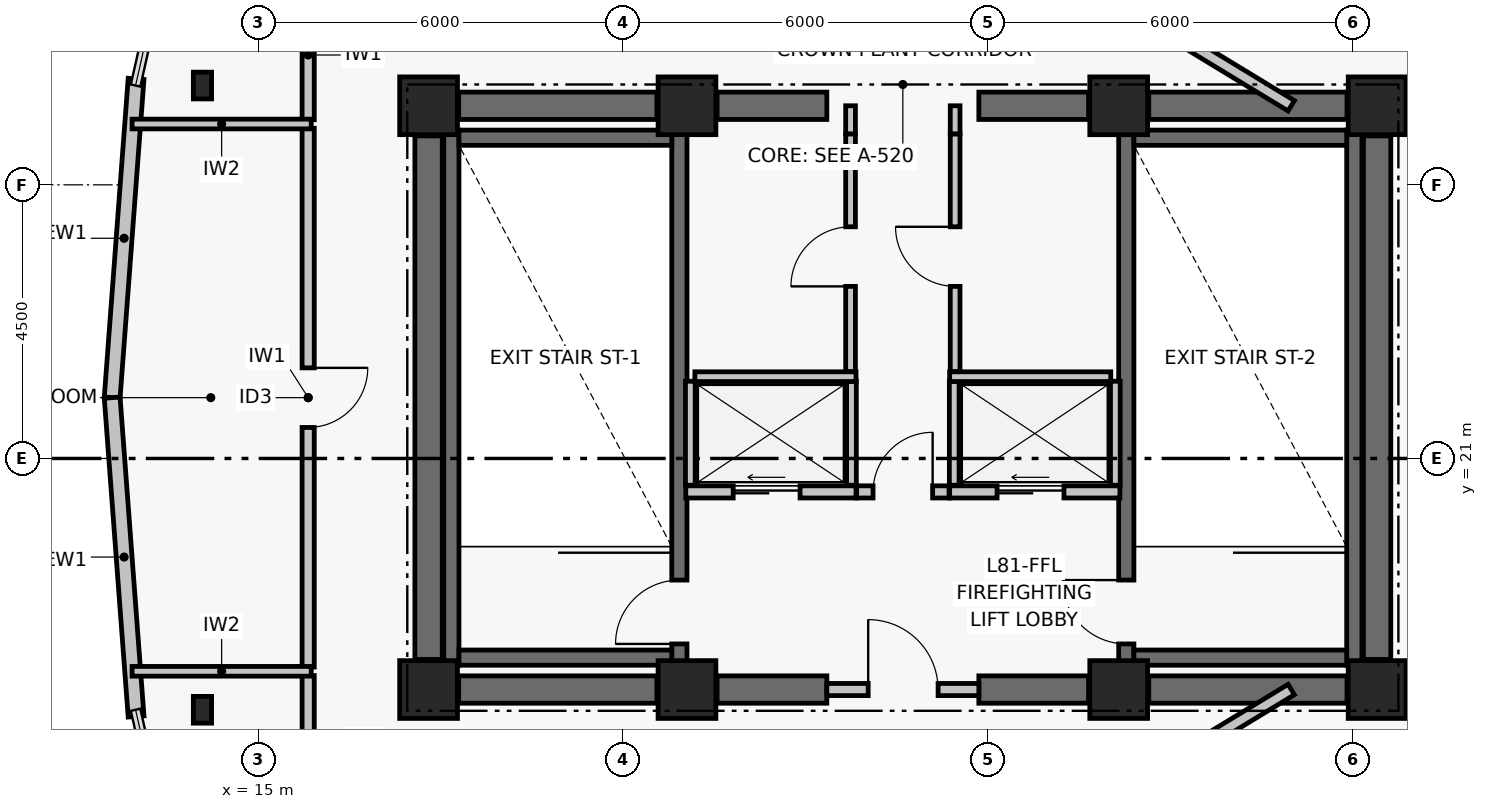
"""IFC4 building model, lengths in metres.
Left out: names, types, materials, properties, quantities, classifications, styles, units other than length and angle.
Written with IfcOpenShell. Run it as: python <this file> out.ifc"""

import sys

from ifc_helpers import new_model, si_unit, direction, frame, frame_2d, origin, origin_2d, place, context, subcontext, project, spatial, rectangle, i_section, extrude, element, fill, save


model = new_model("IFC4")
c1 = context("Model", 3, precision=1e-05, world=origin(), true_north=direction((0.0, 1.0)))
c2 = subcontext(c1, "Body", "Model", "MODEL_VIEW")
j1 = project(units=[si_unit("LENGTHUNIT", "METRE"), si_unit("PLANEANGLEUNIT", "RADIAN")], contexts=[c1])
p1 = place(None, origin())
s1 = spatial("IfcSite", under=j1, at=p1, CompositionType="ELEMENT")
p2 = place(p1, origin())
s2 = spatial("IfcBuilding", under=s1, at=p2, CompositionType="ELEMENT")
p3 = place(p2, frame((0.0, 0.0, 315.22)))
s3 = spatial("IfcBuildingStorey", under=s2, at=p3, CompositionType="ELEMENT", Elevation=315.22)
for number, where, z_axis, x_axis in (
    (1, (17.8, 17.2, 0.0), (0.0, 0.0, 1.0), (1.0, 0.0, 0.0)),
    (2, (22.05, 17.2, 0.0), (0.0, 0.0, 1.0), (1.0, 0.0, 0.0)),
    (3, (29.15, 17.2, 0.0), (0.0, 0.0, 1.0), (1.0, 0.0, 0.0)),
    (4, (33.4, 17.2, 0.0), (0.0, 0.0, 1.0), (1.0, 0.0, 0.0)),
    (5, (17.8, 26.8, 0.0), (0.0, 0.0, 1.0), (1.0, 0.0, 0.0)),
    (6, (22.05, 26.8, 0.0), (0.0, 0.0, 1.0), (1.0, 0.0, 0.0)),
    (7, (29.15, 26.8, 0.0), (0.0, 0.0, 1.0), (1.0, 0.0, 0.0)),
    (8, (33.4, 26.8, 0.0), (0.0, 0.0, 1.0), (1.0, 0.0, 0.0)),
):
    element("IfcColumn", number, at=place(p3, frame(where, z_axis=z_axis, x_axis=x_axis)), inside=s3, PredefinedType="COLUMN", context=c2, shape_type="SweptSolid", body=[
        extrude(rectangle(XDim=0.95, YDim=0.95, at=origin_2d()), origin(), (0.0, 0.0, 1.0), 3.2),
    ])
p4 = place(p3, frame((18.295, 17.2, 0.0), z_axis=(0.0, 0.0, 1.0), x_axis=(1.0, 0.0, 0.0)))
e9 = element("IfcWall", 9, at=p4, inside=s3, PredefinedType="SHEAR", context=c2, shape_type="SweptSolid", body=[
    extrude(rectangle(XDim=3.26, YDim=0.45, at=frame_2d((1.63, 0.0))), origin(), (0.0, 0.0, 1.0), 2.96),
])
p5 = place(p3, frame((22.545, 17.2, 0.0), z_axis=(0.0, 0.0, 1.0), x_axis=(1.0, 0.0, 0.0)))
e10 = element("IfcWall", 10, at=p5, inside=s3, PredefinedType="SHEAR", context=c2, shape_type="SweptSolid", body=[
    extrude(rectangle(XDim=1.805, YDim=0.45, at=frame_2d((0.903, 0.0))), origin(), (0.0, 0.0, 1.0), 2.96),
])
p6 = place(p3, frame((26.85, 17.2, 0.0), z_axis=(0.0, 0.0, 1.0), x_axis=(1.0, 0.0, 0.0)))
e11 = element("IfcWall", 11, at=p6, inside=s3, PredefinedType="SHEAR", context=c2, shape_type="SweptSolid", body=[
    extrude(rectangle(XDim=1.805, YDim=0.45, at=frame_2d((0.902, 0.0))), origin(), (0.0, 0.0, 1.0), 2.96),
])
for number, where, z_axis, x_axis in (
    (12, (29.645, 17.2, 0.0), (0.0, 0.0, 1.0), (1.0, 0.0, 0.0)),
    (13, (18.295, 26.8, 0.0), (0.0, 0.0, 1.0), (1.0, 0.0, 0.0)),
):
    element("IfcWall", number, at=place(p3, frame(where, z_axis=z_axis, x_axis=x_axis)), inside=s3, PredefinedType="SHEAR", context=c2, shape_type="SweptSolid", body=[
        extrude(rectangle(XDim=3.26, YDim=0.45, at=frame_2d((1.63, 0.0))), origin(), (0.0, 0.0, 1.0), 2.96),
    ])
p7 = place(p3, frame((22.545, 26.8, 0.0), z_axis=(0.0, 0.0, 1.0), x_axis=(1.0, 0.0, 0.0)))
e14 = element("IfcWall", 14, at=p7, inside=s3, PredefinedType="SHEAR", context=c2, shape_type="SweptSolid", body=[
    extrude(rectangle(XDim=1.805, YDim=0.45, at=frame_2d((0.903, 0.0))), origin(), (0.0, 0.0, 1.0), 2.96),
])
p8 = place(p3, frame((26.85, 26.8, 0.0), z_axis=(0.0, 0.0, 1.0), x_axis=(1.0, 0.0, 0.0)))
e15 = element("IfcWall", 15, at=p8, inside=s3, PredefinedType="SHEAR", context=c2, shape_type="SweptSolid", body=[
    extrude(rectangle(XDim=1.805, YDim=0.45, at=frame_2d((0.902, 0.0))), origin(), (0.0, 0.0, 1.0), 2.96),
])
p9 = place(p3, frame((29.645, 26.8, 0.0), z_axis=(0.0, 0.0, 1.0), x_axis=(1.0, 0.0, 0.0)))
e16 = element("IfcWall", 16, at=p9, inside=s3, PredefinedType="SHEAR", context=c2, shape_type="SweptSolid", body=[
    extrude(rectangle(XDim=3.26, YDim=0.45, at=frame_2d((1.63, 0.0))), origin(), (0.0, 0.0, 1.0), 2.96),
])
for number, where, z_axis, x_axis in (
    (17, (17.8, 17.695, 0.0), (0.0, 0.0, 1.0), (0.0, 1.0, 0.0)),
    (18, (33.4, 17.695, 0.0), (0.0, 0.0, 1.0), (0.0, 1.0, 0.0)),
):
    element("IfcWall", number, at=place(p3, frame(where, z_axis=z_axis, x_axis=x_axis)), inside=s3, PredefinedType="SHEAR", context=c2, shape_type="SweptSolid", body=[
        extrude(rectangle(XDim=8.61, YDim=0.45, at=frame_2d((4.305, 0.0))), origin(), (0.0, 0.0, 1.0), 2.96),
    ])
p10 = place(p3, frame((18.175, 17.6, 0.0), z_axis=(0.0, 0.0, 1.0), x_axis=(0.0, 1.0, 0.0)))
e19 = element("IfcWall", 19, at=p10, inside=s3, PredefinedType="SHEAR", context=c2, shape_type="SweptSolid", body=[
    extrude(rectangle(XDim=8.8, YDim=0.25, at=frame_2d((4.4, 0.0))), origin(), (0.0, 0.0, 1.0), 2.96),
])
p11 = place(p3, frame((21.925, 17.6, 0.0), z_axis=(0.0, 0.0, 1.0), x_axis=(0.0, 1.0, 0.0)))
e20 = element("IfcWall", 20, at=p11, inside=s3, PredefinedType="SHEAR", context=c2, shape_type="SweptSolid", body=[
    extrude(rectangle(XDim=8.8, YDim=0.25, at=frame_2d((4.4, 0.0))), origin(), (0.0, 0.0, 1.0), 2.96),
])
p12 = place(p11, frame((0.35, 0.0, 0.0)))
e21 = element("IfcOpeningElement", 21, at=p12, cuts=e20, PredefinedType="OPENING", context=c2, shape_type="SweptSolid", body=[
    extrude(rectangle(XDim=1.05, YDim=2.08, at=frame_2d((0.525, 1.04))), frame((0.0, 0.135, 0.0), z_axis=(0.0, -1.0, 0.0), x_axis=(1.0, 0.0, 0.0)), (0.0, 0.0, 1.0), 0.27),
])
for number, where, z_axis, x_axis in (
    (22, (18.3, 17.725, 0.0), (0.0, 0.0, 1.0), (1.0, 0.0, 0.0)),
    (23, (18.3, 26.275, 0.0), (0.0, 0.0, 1.0), (1.0, 0.0, 0.0)),
):
    element("IfcWall", number, at=place(p3, frame(where, z_axis=z_axis, x_axis=x_axis)), inside=s3, PredefinedType="SHEAR", context=c2, shape_type="SweptSolid", body=[
        extrude(rectangle(XDim=3.5, YDim=0.25, at=frame_2d((1.75, 0.0))), origin(), (0.0, 0.0, 1.0), 2.96),
    ])
p13 = place(p3, frame((29.275, 17.6, 0.0), z_axis=(0.0, 0.0, 1.0), x_axis=(0.0, 1.0, 0.0)))
e24 = element("IfcWall", 24, at=p13, inside=s3, PredefinedType="SHEAR", context=c2, shape_type="SweptSolid", body=[
    extrude(rectangle(XDim=8.8, YDim=0.25, at=frame_2d((4.4, 0.0))), origin(), (0.0, 0.0, 1.0), 2.96),
])
p14 = place(p13, frame((0.35, 0.0, 0.0)))
e25 = element("IfcOpeningElement", 25, at=p14, cuts=e24, PredefinedType="OPENING", context=c2, shape_type="SweptSolid", body=[
    extrude(rectangle(XDim=1.05, YDim=2.08, at=frame_2d((0.525, 1.04))), frame((0.0, 0.135, 0.0), z_axis=(0.0, -1.0, 0.0), x_axis=(1.0, 0.0, 0.0)), (0.0, 0.0, 1.0), 0.27),
])
p15 = place(p3, frame((33.025, 17.6, 0.0), z_axis=(0.0, 0.0, 1.0), x_axis=(0.0, 1.0, 0.0)))
e26 = element("IfcWall", 26, at=p15, inside=s3, PredefinedType="SHEAR", context=c2, shape_type="SweptSolid", body=[
    extrude(rectangle(XDim=8.8, YDim=0.25, at=frame_2d((4.4, 0.0))), origin(), (0.0, 0.0, 1.0), 2.96),
])
for number, where, z_axis, x_axis in (
    (27, (29.4, 17.725, 0.0), (0.0, 0.0, 1.0), (1.0, 0.0, 0.0)),
    (28, (29.4, 26.275, 0.0), (0.0, 0.0, 1.0), (1.0, 0.0, 0.0)),
):
    element("IfcWall", number, at=place(p3, frame(where, z_axis=z_axis, x_axis=x_axis)), inside=s3, PredefinedType="SHEAR", context=c2, shape_type="SweptSolid", body=[
        extrude(rectangle(XDim=3.5, YDim=0.25, at=frame_2d((1.75, 0.0))), origin(), (0.0, 0.0, 1.0), 2.96),
    ])
for number, where, z_axis, x_axis in (
    (29, (14.081, 27.133, 0.0), (0.0, 0.0, 1.0), (1.0, 0.0, 0.0)),
    (30, (14.081, 16.867, 0.0), (0.0, 0.0, 1.0), (1.0, 0.0, 0.0)),
):
    element("IfcColumn", number, at=place(p3, frame(where, z_axis=z_axis, x_axis=x_axis)), inside=s3, PredefinedType="COLUMN", context=c2, shape_type="SweptSolid", body=[
        extrude(i_section(OverallWidth=0.3, OverallDepth=0.44, WebThickness=0.011, FlangeThickness=0.018, at=origin_2d()), origin(), (0.0, 0.0, 1.0), 3.2),
    ])
for number, where, z_axis, x_axis in (
    (31, (12.596, 22.0, 0.0), (0.0, 0.0, 1.0), (0.075, 0.997, 0.0)),
    (32, (12.99, 16.758, 0.0), (0.0, 0.0, 1.0), (-0.075, 0.997, 0.0)),
):
    element("IfcWall", number, at=place(p3, frame(where, z_axis=z_axis, x_axis=x_axis)), inside=s3, PredefinedType="PARTITIONING", context=c2, shape_type="SweptSolid", body=[
        extrude(rectangle(XDim=5.257, YDim=0.26, at=frame_2d((2.628, 0.0))), origin(), (0.0, 0.0, 1.0), 2.96),
    ])
p16 = place(p3, frame((24.35, 17.2, 0.0), z_axis=(0.0, 0.0, 1.0), x_axis=(1.0, 0.0, 0.0)))
e33 = element("IfcWall", 33, at=p16, inside=s3, PredefinedType="PARTITIONING", context=c2, shape_type="SweptSolid", body=[
    extrude(rectangle(XDim=2.5, YDim=0.2, at=frame_2d((1.25, 0.0))), origin(), (0.0, 0.0, 1.0), 2.09),
])
p17 = place(p16, frame((0.68, 0.0, 0.0)))
e34 = element("IfcOpeningElement", 34, at=p17, cuts=e33, PredefinedType="OPENING", context=c2, shape_type="SweptSolid", body=[
    extrude(rectangle(XDim=1.15, YDim=2.08, at=frame_2d((0.575, 1.04))), frame((0.0, 0.11, 0.0), z_axis=(0.0, -1.0, 0.0), x_axis=(1.0, 0.0, 0.0)), (0.0, 0.0, 1.0), 0.22),
])
p18 = place(p3, frame((24.84, 20.45, 0.0), z_axis=(0.0, 0.0, 1.0), x_axis=(1.0, 0.0, 0.0)))
e35 = element("IfcWall", 35, at=p18, inside=s3, PredefinedType="PARTITIONING", context=c2, shape_type="SweptSolid", body=[
    extrude(rectangle(XDim=1.52, YDim=0.2, at=frame_2d((0.76, 0.0))), origin(), (0.0, 0.0, 1.0), 2.96),
])
p19 = place(p18, frame((0.27, 0.0, 0.0)))
e36 = element("IfcOpeningElement", 36, at=p19, cuts=e35, PredefinedType="OPENING", context=c2, shape_type="SweptSolid", body=[
    extrude(rectangle(XDim=0.98, YDim=2.06, at=frame_2d((0.49, 1.03))), frame((0.0, 0.11, 0.0), z_axis=(0.0, -1.0, 0.0), x_axis=(1.0, 0.0, 0.0)), (0.0, 0.0, 1.0), 0.22),
])
p20 = place(p3, frame((22.03, 20.45, 0.0), z_axis=(0.0, 0.0, 1.0), x_axis=(1.0, 0.0, 0.0)))
e37 = element("IfcWall", 37, at=p20, inside=s3, PredefinedType="PARTITIONING", context=c2, shape_type="SweptSolid", body=[
    extrude(rectangle(XDim=2.8, YDim=0.2, at=frame_2d((1.4, 0.0))), origin(), (0.0, 0.0, 1.0), 2.96),
])
p21 = place(p20, frame((0.78, 0.0, 0.0)))
e38 = element("IfcOpeningElement", 38, at=p21, cuts=e37, PredefinedType="OPENING", context=c2, shape_type="SweptSolid", body=[
    extrude(rectangle(XDim=1.1, YDim=2.08, at=frame_2d((0.55, 1.04))), frame((0.0, 0.11, 0.0), z_axis=(0.0, -1.0, 0.0), x_axis=(1.0, 0.0, 0.0)), (0.0, 0.0, 1.0), 0.22),
])
p22 = place(p3, frame((26.37, 20.45, 0.0), z_axis=(0.0, 0.0, 1.0), x_axis=(1.0, 0.0, 0.0)))
e39 = element("IfcWall", 39, at=p22, inside=s3, PredefinedType="PARTITIONING", context=c2, shape_type="SweptSolid", body=[
    extrude(rectangle(XDim=2.8, YDim=0.2, at=frame_2d((1.4, 0.0))), origin(), (0.0, 0.0, 1.0), 2.96),
])
p23 = place(p22, frame((0.78, 0.0, 0.0)))
e40 = element("IfcOpeningElement", 40, at=p23, cuts=e39, PredefinedType="OPENING", context=c2, shape_type="SweptSolid", body=[
    extrude(rectangle(XDim=1.1, YDim=2.08, at=frame_2d((0.55, 1.04))), frame((0.0, 0.11, 0.0), z_axis=(0.0, -1.0, 0.0), x_axis=(1.0, 0.0, 0.0)), (0.0, 0.0, 1.0), 0.22),
])
for number, where, z_axis, x_axis in (
    (41, (22.105, 20.56, 0.0), (0.0, 0.0, 1.0), (0.0, 1.0, 0.0)),
    (42, (24.755, 20.56, 0.0), (0.0, 0.0, 1.0), (0.0, 1.0, 0.0)),
):
    element("IfcWall", number, at=place(p3, frame(where, z_axis=z_axis, x_axis=x_axis)), inside=s3, PredefinedType="PARTITIONING", context=c2, shape_type="SweptSolid", body=[
        extrude(rectangle(XDim=1.71, YDim=0.16, at=frame_2d((0.855, 0.0))), origin(), (0.0, 0.0, 1.0), 2.96),
    ])
p24 = place(p3, frame((22.18, 22.345, 0.0), z_axis=(0.0, 0.0, 1.0), x_axis=(1.0, 0.0, 0.0)))
e43 = element("IfcWall", 43, at=p24, inside=s3, PredefinedType="PARTITIONING", context=c2, shape_type="SweptSolid", body=[
    extrude(rectangle(XDim=2.65, YDim=0.16, at=frame_2d((1.325, 0.0))), origin(), (0.0, 0.0, 1.0), 2.96),
])
for number, where, z_axis, x_axis in (
    (44, (29.095, 20.56, 0.0), (0.0, 0.0, 1.0), (0.0, 1.0, 0.0)),
    (45, (26.445, 20.56, 0.0), (0.0, 0.0, 1.0), (0.0, 1.0, 0.0)),
):
    element("IfcWall", number, at=place(p3, frame(where, z_axis=z_axis, x_axis=x_axis)), inside=s3, PredefinedType="PARTITIONING", context=c2, shape_type="SweptSolid", body=[
        extrude(rectangle(XDim=1.71, YDim=0.16, at=frame_2d((0.855, 0.0))), origin(), (0.0, 0.0, 1.0), 2.96),
    ])
p25 = place(p3, frame((26.37, 22.345, 0.0), z_axis=(0.0, 0.0, 1.0), x_axis=(1.0, 0.0, 0.0)))
e46 = element("IfcWall", 46, at=p25, inside=s3, PredefinedType="PARTITIONING", context=c2, shape_type="SweptSolid", body=[
    extrude(rectangle(XDim=2.65, YDim=0.16, at=frame_2d((1.325, 0.0))), origin(), (0.0, 0.0, 1.0), 2.96),
])
p26 = place(p3, frame((24.74, 26.335, 0.0), z_axis=(0.0, 0.0, 1.0), x_axis=(0.0, 1.0, 0.0)))
e47 = element("IfcWall", 47, at=p26, inside=s3, PredefinedType="PARTITIONING", context=c2, shape_type="SweptSolid", body=[
    extrude(rectangle(XDim=0.465, YDim=0.16, at=frame_2d((0.232, 0.0))), origin(), (0.0, 0.0, 1.0), 2.09),
])
p27 = place(p3, frame((24.74, 22.43, 0.0), z_axis=(0.0, 0.0, 1.0), x_axis=(0.0, 1.0, 0.0)))
e48 = element("IfcWall", 48, at=p27, inside=s3, PredefinedType="PARTITIONING", context=c2, shape_type="SweptSolid", body=[
    extrude(rectangle(XDim=3.905, YDim=0.16, at=frame_2d((1.953, 0.0))), origin(), (0.0, 0.0, 1.0), 2.96),
])
p28 = place(p27, frame((1.4, 0.0, 0.0)))
e49 = element("IfcOpeningElement", 49, at=p28, cuts=e48, PredefinedType="OPENING", context=c2, shape_type="SweptSolid", body=[
    extrude(rectangle(XDim=0.98, YDim=2.06, at=frame_2d((0.49, 1.03))), frame((0.0, 0.09, 0.0), z_axis=(0.0, -1.0, 0.0), x_axis=(1.0, 0.0, 0.0)), (0.0, 0.0, 1.0), 0.18),
])
p29 = place(p3, frame((26.46, 26.335, 0.0), z_axis=(0.0, 0.0, 1.0), x_axis=(0.0, 1.0, 0.0)))
e50 = element("IfcWall", 50, at=p29, inside=s3, PredefinedType="PARTITIONING", context=c2, shape_type="SweptSolid", body=[
    extrude(rectangle(XDim=0.465, YDim=0.16, at=frame_2d((0.232, 0.0))), origin(), (0.0, 0.0, 1.0), 2.09),
])
p30 = place(p3, frame((26.46, 22.43, 0.0), z_axis=(0.0, 0.0, 1.0), x_axis=(0.0, 1.0, 0.0)))
e51 = element("IfcWall", 51, at=p30, inside=s3, PredefinedType="PARTITIONING", context=c2, shape_type="SweptSolid", body=[
    extrude(rectangle(XDim=3.905, YDim=0.16, at=frame_2d((1.953, 0.0))), origin(), (0.0, 0.0, 1.0), 2.96),
])
p31 = place(p30, frame((1.4, 0.0, 0.0)))
e52 = element("IfcOpeningElement", 52, at=p31, cuts=e51, PredefinedType="OPENING", context=c2, shape_type="SweptSolid", body=[
    extrude(rectangle(XDim=0.98, YDim=2.06, at=frame_2d((0.49, 1.03))), frame((0.0, 0.09, 0.0), z_axis=(0.0, -1.0, 0.0), x_axis=(1.0, 0.0, 0.0)), (0.0, 0.0, 1.0), 0.18),
])
p32 = place(p3, frame((15.82, 17.43, 0.0), z_axis=(0.0, 0.0, 1.0), x_axis=(0.0, -1.0, 0.0)))
e53 = element("IfcWall", 53, at=p32, inside=s3, PredefinedType="PARTITIONING", context=c2, shape_type="SweptSolid", body=[
    extrude(rectangle(XDim=2.13, YDim=0.2, at=frame_2d((1.065, 0.0))), origin(), (0.0, 0.0, 1.0), 1.85),
])
for number, where, z_axis, x_axis in (
    (54, (28.747, 15.232, 0.0), (0.0, 0.0, 1.0), (0.855, 0.519, 0.0)),
    (55, (31.988, 26.8, 0.0), (0.0, 0.0, 1.0), (-0.855, 0.519, 0.0)),
):
    element("IfcWall", number, at=place(p3, frame(where, z_axis=z_axis, x_axis=x_axis)), inside=s3, PredefinedType="PARTITIONING", context=c2, shape_type="SweptSolid", body=[
        extrude(rectangle(XDim=3.792, YDim=0.2, at=frame_2d((1.896, 0.0))), origin(), (0.0, 0.0, 1.0), 2.09),
    ])
p33 = place(p3, frame((15.82, 28.7, 0.0), z_axis=(0.0, 0.0, 1.0), x_axis=(0.0, -1.0, 0.0)))
e56 = element("IfcWall", 56, at=p33, inside=s3, PredefinedType="PARTITIONING", context=c2, shape_type="SweptSolid", body=[
    extrude(rectangle(XDim=2.13, YDim=0.2, at=frame_2d((1.065, 0.0))), origin(), (0.0, 0.0, 1.0), 1.85),
])
p34 = place(p3, frame((15.82, 26.43, 0.0), z_axis=(0.0, 0.0, 1.0), x_axis=(0.0, -1.0, 0.0)))
e57 = element("IfcWall", 57, at=p34, inside=s3, PredefinedType="PARTITIONING", context=c2, shape_type="SweptSolid", body=[
    extrude(rectangle(XDim=8.86, YDim=0.2, at=frame_2d((4.43, 0.0))), origin(), (0.0, 0.0, 1.0), 2.59),
])
p35 = place(p34, frame((3.94, 0.0, 0.0)))
e58 = element("IfcOpeningElement", 58, at=p35, cuts=e57, PredefinedType="OPENING", context=c2, shape_type="SweptSolid", body=[
    extrude(rectangle(XDim=0.98, YDim=2.06, at=frame_2d((0.49, 1.03))), frame((0.0, 0.11, 0.0), z_axis=(0.0, -1.0, 0.0), x_axis=(1.0, 0.0, 0.0)), (0.0, 0.0, 1.0), 0.22),
])
for number, where, z_axis, x_axis in (
    (59, (12.924, 17.5, 0.0), (0.0, 0.0, 1.0), (1.0, 0.0, 0.0)),
    (60, (12.924, 26.5, 0.0), (0.0, 0.0, 1.0), (1.0, 0.0, 0.0)),
):
    element("IfcWall", number, at=place(p3, frame(where, z_axis=z_axis, x_axis=x_axis)), inside=s3, PredefinedType="PARTITIONING", context=c2, shape_type="SweptSolid", body=[
        extrude(rectangle(XDim=2.946, YDim=0.16, at=frame_2d((1.473, 0.0))), origin(), (0.0, 0.0, 1.0), 2.44),
    ])
p36 = place(p12, origin())
e61 = element("IfcDoor", 61, at=p36, inside=s3, OperationType="SINGLE_SWING_LEFT", PredefinedType="DOOR", context=c2, shape_type="SweptSolid", body=[
    extrude(rectangle(XDim=1.05, YDim=2.08, at=frame_2d((0.525, 1.04))), frame((0.0, 0.025, 0.0), z_axis=(0.0, -1.0, 0.0), x_axis=(1.0, 0.0, 0.0)), (0.0, 0.0, 1.0), 0.05),
])
fill(e21, e61)
p37 = place(p14, origin())
e62 = element("IfcDoor", 62, at=p37, inside=s3, OperationType="SINGLE_SWING_RIGHT", PredefinedType="DOOR", context=c2, shape_type="SweptSolid", body=[
    extrude(rectangle(XDim=1.05, YDim=2.08, at=frame_2d((0.525, 1.04))), frame((0.0, 0.025, 0.0), z_axis=(0.0, -1.0, 0.0), x_axis=(1.0, 0.0, 0.0)), (0.0, 0.0, 1.0), 0.05),
])
fill(e25, e62)
p38 = place(p17, origin())
e63 = element("IfcDoor", 63, at=p38, inside=s3, OperationType="SINGLE_SWING_LEFT", PredefinedType="DOOR", context=c2, shape_type="SweptSolid", body=[
    extrude(rectangle(XDim=1.15, YDim=2.08, at=frame_2d((0.575, 1.04))), frame((0.0, 0.025, 0.0), z_axis=(0.0, -1.0, 0.0), x_axis=(1.0, 0.0, 0.0)), (0.0, 0.0, 1.0), 0.05),
])
fill(e34, e63)
p39 = place(p19, origin())
e64 = element("IfcDoor", 64, at=p39, inside=s3, OperationType="SINGLE_SWING_RIGHT", PredefinedType="DOOR", context=c2, shape_type="SweptSolid", body=[
    extrude(rectangle(XDim=0.98, YDim=2.06, at=frame_2d((0.49, 1.03))), frame((0.0, 0.025, 0.0), z_axis=(0.0, -1.0, 0.0), x_axis=(1.0, 0.0, 0.0)), (0.0, 0.0, 1.0), 0.05),
])
fill(e36, e64)
p40 = place(p21, origin())
e65 = element("IfcDoor", 65, at=p40, inside=s3, OperationType="DOUBLE_DOOR_SLIDING", PredefinedType="DOOR", context=c2, shape_type="SweptSolid", body=[
    extrude(rectangle(XDim=1.1, YDim=2.08, at=frame_2d((0.55, 1.04))), frame((0.0, 0.025, 0.0), z_axis=(0.0, -1.0, 0.0), x_axis=(1.0, 0.0, 0.0)), (0.0, 0.0, 1.0), 0.05),
])
fill(e38, e65)
p41 = place(p23, origin())
e66 = element("IfcDoor", 66, at=p41, inside=s3, OperationType="DOUBLE_DOOR_SLIDING", PredefinedType="DOOR", context=c2, shape_type="SweptSolid", body=[
    extrude(rectangle(XDim=1.1, YDim=2.08, at=frame_2d((0.55, 1.04))), frame((0.0, 0.025, 0.0), z_axis=(0.0, -1.0, 0.0), x_axis=(1.0, 0.0, 0.0)), (0.0, 0.0, 1.0), 0.05),
])
fill(e40, e66)
p42 = place(p28, origin())
e67 = element("IfcDoor", 67, at=p42, inside=s3, OperationType="SINGLE_SWING_LEFT", PredefinedType="DOOR", context=c2, shape_type="SweptSolid", body=[
    extrude(rectangle(XDim=0.98, YDim=2.06, at=frame_2d((0.49, 1.03))), frame((0.0, 0.025, 0.0), z_axis=(0.0, -1.0, 0.0), x_axis=(1.0, 0.0, 0.0)), (0.0, 0.0, 1.0), 0.05),
])
fill(e49, e67)
p43 = place(p31, origin())
e68 = element("IfcDoor", 68, at=p43, inside=s3, OperationType="SINGLE_SWING_RIGHT", PredefinedType="DOOR", context=c2, shape_type="SweptSolid", body=[
    extrude(rectangle(XDim=0.98, YDim=2.06, at=frame_2d((0.49, 1.03))), frame((0.0, 0.025, 0.0), z_axis=(0.0, -1.0, 0.0), x_axis=(1.0, 0.0, 0.0)), (0.0, 0.0, 1.0), 0.05),
])
fill(e52, e68)
p44 = place(p35, origin())
e69 = element("IfcDoor", 69, at=p44, inside=s3, OperationType="SINGLE_SWING_LEFT", PredefinedType="DOOR", context=c2, shape_type="SweptSolid", body=[
    extrude(rectangle(XDim=0.98, YDim=2.06, at=frame_2d((0.49, 1.03))), frame((0.0, 0.025, 0.0), z_axis=(0.0, -1.0, 0.0), x_axis=(1.0, 0.0, 0.0)), (0.0, 0.0, 1.0), 0.05),
])
fill(e58, e69)
save(model, sys.argv[1])
